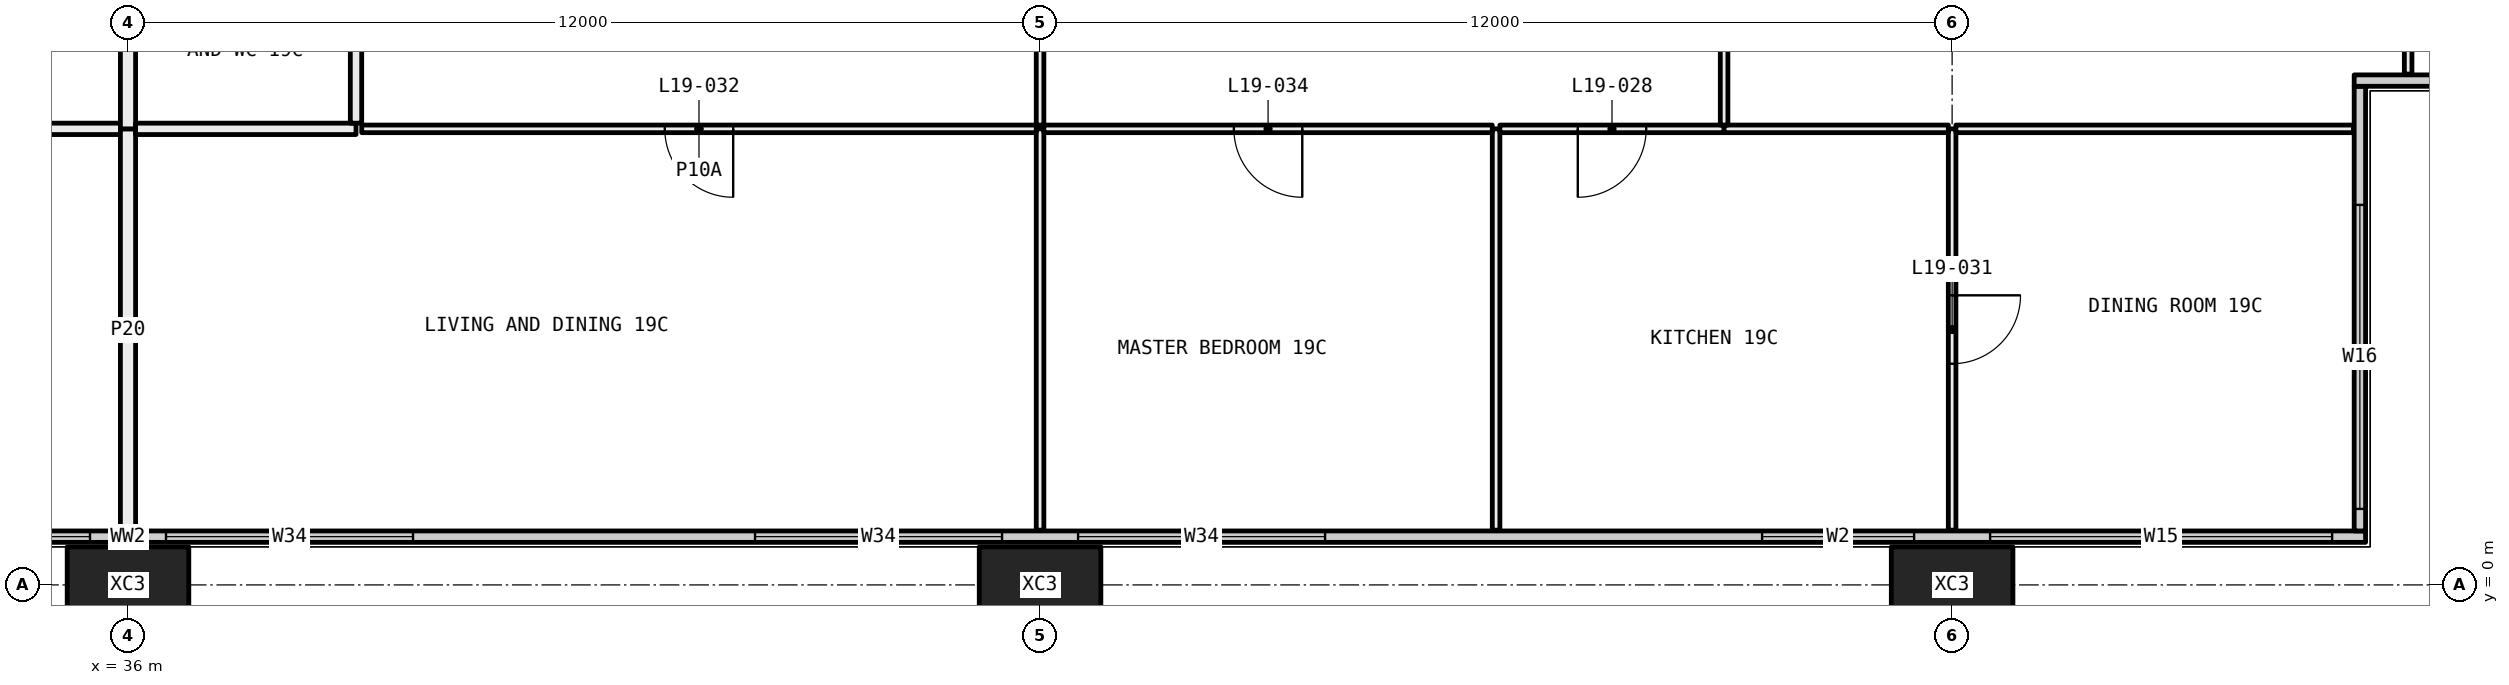
"""IFC4 building model, lengths in metres.
Left out: names, types, materials, properties, quantities, classifications, styles, units other than length and angle.
Written with IfcOpenShell. Run it as: python <this file> out.ifc"""

import sys

from ifc_helpers import new_model, si_unit, direction, frame, frame_2d, origin, origin_2d, place, context, subcontext, project, spatial, rectangle, hollow_rectangle, extrude, element, fill, save


model = new_model("IFC4")
c1 = context("Model", 3, precision=1e-05, world=origin(), true_north=direction((0.0, 1.0)))
c2 = subcontext(c1, "Body", "Model", "MODEL_VIEW")
j1 = project(units=[si_unit("LENGTHUNIT", "METRE"), si_unit("PLANEANGLEUNIT", "RADIAN")], contexts=[c1])
p1 = place(None, origin())
s1 = spatial("IfcSite", under=j1, at=p1, CompositionType="ELEMENT")
p2 = place(p1, origin())
s2 = spatial("IfcBuilding", under=s1, at=p2, CompositionType="ELEMENT")
p3 = place(p2, frame((0.0, 0.0, 78.3)))
s3 = spatial("IfcBuildingStorey", under=s2, at=p3, CompositionType="ELEMENT", Elevation=78.3)
for number, where, z_axis, x_axis in (
    (1, (36.0, 0.0, -0.4), (0.0, 0.0, 1.0), (1.0, 0.0, 0.0)),
    (2, (48.0, 0.0, -0.4), (0.0, 0.0, 1.0), (1.0, 0.0, 0.0)),
    (3, (60.0, 0.0, -0.4), (0.0, 0.0, 1.0), (1.0, 0.0, 0.0)),
):
    element("IfcColumn", number, at=place(p3, frame(where, z_axis=z_axis, x_axis=x_axis)), inside=s3, PredefinedType="COLUMN", context=c2, shape_type="SweptSolid", body=[
        extrude(hollow_rectangle(XDim=1.6, YDim=1.0, WallThickness=0.065, at=origin_2d()), origin(), (0.0, 0.0, 1.0), 3.45),
    ])
p4 = place(p3, frame((6.56, 0.635, 0.0), z_axis=(0.0, 0.0, 1.0), x_axis=(1.0, 0.0, 0.0)))
e4 = element("IfcWall", 4, at=p4, inside=s3, PredefinedType="ELEMENTEDWALL", context=c2, shape_type="SweptSolid", body=[
    extrude(rectangle(XDim=58.88, YDim=0.15, at=frame_2d((29.44, 0.0))), origin(), (0.0, 0.0, 1.0), 3.05),
])
p5 = place(p4, frame((0.44, 0.0, 0.45)))
e5 = element("IfcOpeningElement", 5, at=p5, cuts=e4, PredefinedType="OPENING", context=c2, shape_type="SweptSolid", body=[
    extrude(rectangle(XDim=4.5, YDim=2.55, at=frame_2d((2.25, 1.275))), frame((0.0, 0.085, 0.0), z_axis=(0.0, -1.0, 0.0), x_axis=(1.0, 0.0, 0.0)), (0.0, 0.0, 1.0), 0.17),
])
p6 = place(p4, frame((5.94, 0.0, 0.45)))
e6 = element("IfcOpeningElement", 6, at=p6, cuts=e4, PredefinedType="OPENING", context=c2, shape_type="SweptSolid", body=[
    extrude(rectangle(XDim=3.25, YDim=2.55, at=frame_2d((1.625, 1.275))), frame((0.0, 0.085, 0.0), z_axis=(0.0, -1.0, 0.0), x_axis=(1.0, 0.0, 0.0)), (0.0, 0.0, 1.0), 0.17),
])
p7 = place(p4, frame((13.69, 0.0, 0.45)))
e7 = element("IfcOpeningElement", 7, at=p7, cuts=e4, PredefinedType="OPENING", context=c2, shape_type="SweptSolid", body=[
    extrude(rectangle(XDim=3.25, YDim=2.55, at=frame_2d((1.625, 1.275))), frame((0.0, 0.085, 0.0), z_axis=(0.0, -1.0, 0.0), x_axis=(1.0, 0.0, 0.0)), (0.0, 0.0, 1.0), 0.17),
])
p8 = place(p4, frame((17.94, 0.0, 0.45)))
e8 = element("IfcOpeningElement", 8, at=p8, cuts=e4, PredefinedType="OPENING", context=c2, shape_type="SweptSolid", body=[
    extrude(rectangle(XDim=3.25, YDim=2.55, at=frame_2d((1.625, 1.275))), frame((0.0, 0.085, 0.0), z_axis=(0.0, -1.0, 0.0), x_axis=(1.0, 0.0, 0.0)), (0.0, 0.0, 1.0), 0.17),
])
p9 = place(p4, frame((26.94, 0.0, 0.45)))
e9 = element("IfcOpeningElement", 9, at=p9, cuts=e4, PredefinedType="OPENING", context=c2, shape_type="SweptSolid", body=[
    extrude(rectangle(XDim=2.0, YDim=2.55, at=frame_2d((1.0, 1.275))), frame((0.0, 0.085, 0.0), z_axis=(0.0, -1.0, 0.0), x_axis=(1.0, 0.0, 0.0)), (0.0, 0.0, 1.0), 0.17),
])
p10 = place(p4, frame((29.94, 0.0, 0.45)))
e10 = element("IfcOpeningElement", 10, at=p10, cuts=e4, PredefinedType="OPENING", context=c2, shape_type="SweptSolid", body=[
    extrude(rectangle(XDim=3.25, YDim=2.55, at=frame_2d((1.625, 1.275))), frame((0.0, 0.085, 0.0), z_axis=(0.0, -1.0, 0.0), x_axis=(1.0, 0.0, 0.0)), (0.0, 0.0, 1.0), 0.17),
])
p11 = place(p4, frame((37.69, 0.0, 0.45)))
e11 = element("IfcOpeningElement", 11, at=p11, cuts=e4, PredefinedType="OPENING", context=c2, shape_type="SweptSolid", body=[
    extrude(rectangle(XDim=3.25, YDim=2.55, at=frame_2d((1.625, 1.275))), frame((0.0, 0.085, 0.0), z_axis=(0.0, -1.0, 0.0), x_axis=(1.0, 0.0, 0.0)), (0.0, 0.0, 1.0), 0.17),
])
p12 = place(p4, frame((41.94, 0.0, 0.45)))
e12 = element("IfcOpeningElement", 12, at=p12, cuts=e4, PredefinedType="OPENING", context=c2, shape_type="SweptSolid", body=[
    extrude(rectangle(XDim=3.25, YDim=2.55, at=frame_2d((1.625, 1.275))), frame((0.0, 0.085, 0.0), z_axis=(0.0, -1.0, 0.0), x_axis=(1.0, 0.0, 0.0)), (0.0, 0.0, 1.0), 0.17),
])
p13 = place(p4, frame((50.94, 0.0, 0.45)))
e13 = element("IfcOpeningElement", 13, at=p13, cuts=e4, PredefinedType="OPENING", context=c2, shape_type="SweptSolid", body=[
    extrude(rectangle(XDim=2.0, YDim=2.55, at=frame_2d((1.0, 1.275))), frame((0.0, 0.085, 0.0), z_axis=(0.0, -1.0, 0.0), x_axis=(1.0, 0.0, 0.0)), (0.0, 0.0, 1.0), 0.17),
])
p14 = place(p4, frame((53.94, 0.0, 0.45)))
e14 = element("IfcOpeningElement", 14, at=p14, cuts=e4, PredefinedType="OPENING", context=c2, shape_type="SweptSolid", body=[
    extrude(rectangle(XDim=4.5, YDim=2.55, at=frame_2d((2.25, 1.275))), frame((0.0, 0.085, 0.0), z_axis=(0.0, -1.0, 0.0), x_axis=(1.0, 0.0, 0.0)), (0.0, 0.0, 1.0), 0.17),
])
p15 = place(p3, frame((65.365, 0.71, 0.0), z_axis=(0.0, 0.0, 1.0), x_axis=(0.0, 1.0, 0.0)))
e15 = element("IfcWall", 15, at=p15, inside=s3, PredefinedType="ELEMENTEDWALL", context=c2, shape_type="SweptSolid", body=[
    extrude(rectangle(XDim=5.85, YDim=0.15, at=frame_2d((2.925, 0.0))), origin(), (0.0, 0.0, 1.0), 3.05),
])
p16 = place(p15, frame((0.29, 0.0, 0.45)))
e16 = element("IfcOpeningElement", 16, at=p16, cuts=e15, PredefinedType="OPENING", context=c2, shape_type="SweptSolid", body=[
    extrude(rectangle(XDim=4.0, YDim=2.55, at=frame_2d((2.0, 1.275))), frame((0.0, 0.085, 0.0), z_axis=(0.0, -1.0, 0.0), x_axis=(1.0, 0.0, 0.0)), (0.0, 0.0, 1.0), 0.17),
])
p17 = place(p3, frame((65.29, 6.635, 0.0), z_axis=(0.0, 0.0, 1.0), x_axis=(1.0, 0.0, 0.0)))
e17 = element("IfcWall", 17, at=p17, inside=s3, PredefinedType="ELEMENTEDWALL", context=c2, shape_type="SweptSolid", body=[
    extrude(rectangle(XDim=6.15, YDim=0.15, at=frame_2d((3.075, 0.0))), origin(), (0.0, 0.0, 1.0), 3.05),
])
p18 = place(p17, frame((1.71, 0.0, 0.45)))
e18 = element("IfcOpeningElement", 18, at=p18, cuts=e17, PredefinedType="OPENING", context=c2, shape_type="SweptSolid", body=[
    extrude(rectangle(XDim=4.0, YDim=2.55, at=frame_2d((2.0, 1.275))), frame((0.0, 0.085, 0.0), z_axis=(0.0, -1.0, 0.0), x_axis=(1.0, 0.0, 0.0)), (0.0, 0.0, 1.0), 0.17),
])
p19 = place(p3, frame((35.9, 6.0, 0.0), z_axis=(0.0, 0.0, 1.0), x_axis=(-1.0, 0.0, 0.0)))
e19 = element("IfcWall", 19, at=p19, inside=s3, PredefinedType="PARTITIONING", context=c2, shape_type="SweptSolid", body=[
    extrude(rectangle(XDim=2.9, YDim=0.15, at=frame_2d((1.45, 0.0))), origin(), (0.0, 0.0, 1.0), 3.05),
])
p20 = place(p3, frame((36.0, 0.72, 0.0), z_axis=(0.0, 0.0, 1.0), x_axis=(0.0, 1.0, 0.0)))
e20 = element("IfcWall", 20, at=p20, inside=s3, PredefinedType="PARTITIONING", context=c2, shape_type="SweptSolid", body=[
    extrude(rectangle(XDim=5.28, YDim=0.2, at=frame_2d((2.64, 0.0))), origin(), (0.0, 0.0, 1.0), 2.45),
])
p21 = place(p3, frame((36.0, 6.0, 0.0), z_axis=(0.0, 0.0, 1.0), x_axis=(0.0, 1.0, 0.0)))
e21 = element("IfcWall", 21, at=p21, inside=s3, PredefinedType="PARTITIONING", context=c2, shape_type="SweptSolid", body=[
    extrude(rectangle(XDim=5.2, YDim=0.2, at=frame_2d((2.6, 0.0))), origin(), (0.0, 0.0, 1.0), 2.45),
])
p22 = place(p3, frame((48.0, 0.72, 0.0), z_axis=(0.0, 0.0, 1.0), x_axis=(0.0, 1.0, 0.0)))
e22 = element("IfcWall", 22, at=p22, inside=s3, PredefinedType="PARTITIONING", context=c2, shape_type="SweptSolid", body=[
    extrude(rectangle(XDim=5.28, YDim=0.1, at=frame_2d((2.64, 0.0))), origin(), (0.0, 0.0, 1.0), 2.45),
])
p23 = place(p3, frame((39.0, 6.0, 0.0), z_axis=(0.0, 0.0, 1.0), x_axis=(-1.0, 0.0, 0.0)))
e23 = element("IfcWall", 23, at=p23, inside=s3, PredefinedType="PARTITIONING", context=c2, shape_type="SweptSolid", body=[
    extrude(rectangle(XDim=2.9, YDim=0.15, at=frame_2d((1.45, 0.0))), origin(), (0.0, 0.0, 1.0), 3.05),
])
p24 = place(p3, frame((47.95, 6.0, 0.0), z_axis=(0.0, 0.0, 1.0), x_axis=(-1.0, 0.0, 0.0)))
e24 = element("IfcWall", 24, at=p24, inside=s3, PredefinedType="PARTITIONING", context=c2, shape_type="SweptSolid", body=[
    extrude(rectangle(XDim=8.875, YDim=0.1, at=frame_2d((4.438, 0.0))), origin(), (0.0, 0.0, 1.0), 2.45),
])
p25 = place(p24, frame((3.988, 0.0, 0.0)))
e25 = element("IfcOpeningElement", 25, at=p25, cuts=e24, PredefinedType="OPENING", context=c2, shape_type="SweptSolid", body=[
    extrude(rectangle(XDim=0.9, YDim=2.1, at=frame_2d((0.45, 1.05))), frame((0.0, 0.06, 0.0), z_axis=(0.0, -1.0, 0.0), x_axis=(1.0, 0.0, 0.0)), (0.0, 0.0, 1.0), 0.12),
])
p26 = place(p3, frame((54.0, 0.72, 0.0), z_axis=(0.0, 0.0, 1.0), x_axis=(0.0, 1.0, 0.0)))
e26 = element("IfcWall", 26, at=p26, inside=s3, PredefinedType="PARTITIONING", context=c2, shape_type="SweptSolid", body=[
    extrude(rectangle(XDim=5.28, YDim=0.1, at=frame_2d((2.64, 0.0))), origin(), (0.0, 0.0, 1.0), 3.05),
])
p27 = place(p3, frame((53.95, 6.0, 0.0), z_axis=(0.0, 0.0, 1.0), x_axis=(-1.0, 0.0, 0.0)))
e27 = element("IfcWall", 27, at=p27, inside=s3, PredefinedType="PARTITIONING", context=c2, shape_type="SweptSolid", body=[
    extrude(rectangle(XDim=5.9, YDim=0.1, at=frame_2d((2.95, 0.0))), origin(), (0.0, 0.0, 1.0), 2.45),
])
p28 = place(p27, frame((2.5, 0.0, 0.0)))
e28 = element("IfcOpeningElement", 28, at=p28, cuts=e27, PredefinedType="OPENING", context=c2, shape_type="SweptSolid", body=[
    extrude(rectangle(XDim=0.9, YDim=2.1, at=frame_2d((0.45, 1.05))), frame((0.0, 0.06, 0.0), z_axis=(0.0, -1.0, 0.0), x_axis=(1.0, 0.0, 0.0)), (0.0, 0.0, 1.0), 0.12),
])
p29 = place(p3, frame((60.0, 0.72, 0.0), z_axis=(0.0, 0.0, 1.0), x_axis=(0.0, 1.0, 0.0)))
e29 = element("IfcWall", 29, at=p29, inside=s3, PredefinedType="PARTITIONING", context=c2, shape_type="SweptSolid", body=[
    extrude(rectangle(XDim=5.28, YDim=0.1, at=frame_2d((2.64, 0.0))), origin(), (0.0, 0.0, 1.0), 2.45),
])
p30 = place(p29, frame((2.19, 0.0, 0.0)))
e30 = element("IfcOpeningElement", 30, at=p30, cuts=e29, PredefinedType="OPENING", context=c2, shape_type="SweptSolid", body=[
    extrude(rectangle(XDim=0.9, YDim=2.1, at=frame_2d((0.45, 1.05))), frame((0.0, 0.06, 0.0), z_axis=(0.0, -1.0, 0.0), x_axis=(1.0, 0.0, 0.0)), (0.0, 0.0, 1.0), 0.12),
])
p31 = place(p3, frame((57.0, 6.0, 0.0), z_axis=(0.0, 0.0, 1.0), x_axis=(-1.0, 0.0, 0.0)))
e31 = element("IfcWall", 31, at=p31, inside=s3, PredefinedType="PARTITIONING", context=c2, shape_type="SweptSolid", body=[
    extrude(rectangle(XDim=2.95, YDim=0.1, at=frame_2d((1.475, 0.0))), origin(), (0.0, 0.0, 1.0), 3.05),
])
p32 = place(p31, frame((1.025, 0.0, 0.0)))
e32 = element("IfcOpeningElement", 32, at=p32, cuts=e31, PredefinedType="OPENING", context=c2, shape_type="SweptSolid", body=[
    extrude(rectangle(XDim=0.9, YDim=2.1, at=frame_2d((0.45, 1.05))), frame((0.0, 0.06, 0.0), z_axis=(0.0, -1.0, 0.0), x_axis=(1.0, 0.0, 0.0)), (0.0, 0.0, 1.0), 0.12),
])
p33 = place(p3, frame((59.95, 6.0, 0.0), z_axis=(0.0, 0.0, 1.0), x_axis=(-1.0, 0.0, 0.0)))
e33 = element("IfcWall", 33, at=p33, inside=s3, PredefinedType="PARTITIONING", context=c2, shape_type="SweptSolid", body=[
    extrude(rectangle(XDim=2.95, YDim=0.1, at=frame_2d((1.475, 0.0))), origin(), (0.0, 0.0, 1.0), 2.45),
])
p34 = place(p3, frame((65.28, 6.0, 0.0), z_axis=(0.0, 0.0, 1.0), x_axis=(-1.0, 0.0, 0.0)))
e34 = element("IfcWall", 34, at=p34, inside=s3, PredefinedType="PARTITIONING", context=c2, shape_type="SweptSolid", body=[
    extrude(rectangle(XDim=5.23, YDim=0.1, at=frame_2d((2.615, 0.0))), origin(), (0.0, 0.0, 1.0), 2.45),
])
p35 = place(p3, frame((39.0, 6.075, 0.0), z_axis=(0.0, 0.0, 1.0), x_axis=(0.0, 1.0, 0.0)))
e35 = element("IfcWall", 35, at=p35, inside=s3, PredefinedType="PARTITIONING", context=c2, shape_type="SweptSolid", body=[
    extrude(rectangle(XDim=5.925, YDim=0.15, at=frame_2d((2.962, 0.0))), origin(), (0.0, 0.0, 1.0), 2.45),
])
p36 = place(p35, frame((2.512, 0.0, 0.0)))
e36 = element("IfcOpeningElement", 36, at=p36, cuts=e35, PredefinedType="OPENING", context=c2, shape_type="SweptSolid", body=[
    extrude(rectangle(XDim=0.9, YDim=2.1, at=frame_2d((0.45, 1.05))), frame((0.0, 0.085, 0.0), z_axis=(0.0, -1.0, 0.0), x_axis=(1.0, 0.0, 0.0)), (0.0, 0.0, 1.0), 0.17),
])
p37 = place(p3, frame((48.0, 6.05, 0.0), z_axis=(0.0, 0.0, 1.0), x_axis=(0.0, 1.0, 0.0)))
e37 = element("IfcWall", 37, at=p37, inside=s3, PredefinedType="PARTITIONING", context=c2, shape_type="SweptSolid", body=[
    extrude(rectangle(XDim=5.15, YDim=0.1, at=frame_2d((2.575, 0.0))), origin(), (0.0, 0.0, 1.0), 2.45),
])
p38 = place(p37, frame((2.125, 0.0, 0.0)))
e38 = element("IfcOpeningElement", 38, at=p38, cuts=e37, PredefinedType="OPENING", context=c2, shape_type="SweptSolid", body=[
    extrude(rectangle(XDim=0.9, YDim=2.1, at=frame_2d((0.45, 1.05))), frame((0.0, 0.06, 0.0), z_axis=(0.0, -1.0, 0.0), x_axis=(1.0, 0.0, 0.0)), (0.0, 0.0, 1.0), 0.12),
])
p39 = place(p3, frame((57.0, 6.05, 0.0), z_axis=(0.0, 0.0, 1.0), x_axis=(0.0, 1.0, 0.0)))
e39 = element("IfcWall", 39, at=p39, inside=s3, PredefinedType="PARTITIONING", context=c2, shape_type="SweptSolid", body=[
    extrude(rectangle(XDim=5.95, YDim=0.1, at=frame_2d((2.975, 0.0))), origin(), (0.0, 0.0, 1.0), 2.45),
])
p40 = place(p39, frame((2.525, 0.0, 0.0)))
e40 = element("IfcOpeningElement", 40, at=p40, cuts=e39, PredefinedType="OPENING", context=c2, shape_type="SweptSolid", body=[
    extrude(rectangle(XDim=0.9, YDim=2.1, at=frame_2d((0.45, 1.05))), frame((0.0, 0.06, 0.0), z_axis=(0.0, -1.0, 0.0), x_axis=(1.0, 0.0, 0.0)), (0.0, 0.0, 1.0), 0.12),
])
p41 = place(p3, frame((66.0, 6.72, 0.0), z_axis=(0.0, 0.0, 1.0), x_axis=(0.0, 1.0, 0.0)))
e41 = element("IfcWall", 41, at=p41, inside=s3, PredefinedType="PARTITIONING", context=c2, shape_type="SweptSolid", body=[
    extrude(rectangle(XDim=5.205, YDim=0.1, at=frame_2d((2.603, 0.0))), origin(), (0.0, 0.0, 1.0), 2.45),
])
p42 = place(p41, frame((2.153, 0.0, 0.0)))
e42 = element("IfcOpeningElement", 42, at=p42, cuts=e41, PredefinedType="OPENING", context=c2, shape_type="SweptSolid", body=[
    extrude(rectangle(XDim=0.9, YDim=2.1, at=frame_2d((0.45, 1.05))), frame((0.0, 0.06, 0.0), z_axis=(0.0, -1.0, 0.0), x_axis=(1.0, 0.0, 0.0)), (0.0, 0.0, 1.0), 0.12),
])
p43 = place(p9, origin())
e43 = element("IfcWindow", 43, at=p43, inside=s3, PartitioningType="SINGLE_PANEL", PredefinedType="WINDOW", context=c2, shape_type="SweptSolid", body=[
    extrude(rectangle(XDim=2.0, YDim=2.55, at=frame_2d((1.0, 1.275))), frame((0.0, 0.03, 0.0), z_axis=(0.0, -1.0, 0.0), x_axis=(1.0, 0.0, 0.0)), (0.0, 0.0, 1.0), 0.06),
])
fill(e9, e43)
p44 = place(p10, origin())
e44 = element("IfcWindow", 44, at=p44, inside=s3, PartitioningType="SINGLE_PANEL", PredefinedType="WINDOW", context=c2, shape_type="SweptSolid", body=[
    extrude(rectangle(XDim=3.25, YDim=2.55, at=frame_2d((1.625, 1.275))), frame((0.0, 0.03, 0.0), z_axis=(0.0, -1.0, 0.0), x_axis=(1.0, 0.0, 0.0)), (0.0, 0.0, 1.0), 0.06),
])
fill(e10, e44)
p45 = place(p11, origin())
e45 = element("IfcWindow", 45, at=p45, inside=s3, PartitioningType="SINGLE_PANEL", PredefinedType="WINDOW", context=c2, shape_type="SweptSolid", body=[
    extrude(rectangle(XDim=3.25, YDim=2.55, at=frame_2d((1.625, 1.275))), frame((0.0, 0.03, 0.0), z_axis=(0.0, -1.0, 0.0), x_axis=(1.0, 0.0, 0.0)), (0.0, 0.0, 1.0), 0.06),
])
fill(e11, e45)
p46 = place(p12, origin())
e46 = element("IfcWindow", 46, at=p46, inside=s3, PartitioningType="SINGLE_PANEL", PredefinedType="WINDOW", context=c2, shape_type="SweptSolid", body=[
    extrude(rectangle(XDim=3.25, YDim=2.55, at=frame_2d((1.625, 1.275))), frame((0.0, 0.03, 0.0), z_axis=(0.0, -1.0, 0.0), x_axis=(1.0, 0.0, 0.0)), (0.0, 0.0, 1.0), 0.06),
])
fill(e12, e46)
p47 = place(p13, origin())
e47 = element("IfcWindow", 47, at=p47, inside=s3, PartitioningType="SINGLE_PANEL", PredefinedType="WINDOW", context=c2, shape_type="SweptSolid", body=[
    extrude(rectangle(XDim=2.0, YDim=2.55, at=frame_2d((1.0, 1.275))), frame((0.0, 0.03, 0.0), z_axis=(0.0, -1.0, 0.0), x_axis=(1.0, 0.0, 0.0)), (0.0, 0.0, 1.0), 0.06),
])
fill(e13, e47)
p48 = place(p14, origin())
e48 = element("IfcWindow", 48, at=p48, inside=s3, PartitioningType="SINGLE_PANEL", PredefinedType="WINDOW", context=c2, shape_type="SweptSolid", body=[
    extrude(rectangle(XDim=4.5, YDim=2.55, at=frame_2d((2.25, 1.275))), frame((0.0, 0.03, 0.0), z_axis=(0.0, -1.0, 0.0), x_axis=(1.0, 0.0, 0.0)), (0.0, 0.0, 1.0), 0.06),
])
fill(e14, e48)
p49 = place(p16, origin())
e49 = element("IfcWindow", 49, at=p49, inside=s3, PartitioningType="SINGLE_PANEL", PredefinedType="WINDOW", context=c2, shape_type="SweptSolid", body=[
    extrude(rectangle(XDim=4.0, YDim=2.55, at=frame_2d((2.0, 1.275))), frame((0.0, 0.03, 0.0), z_axis=(0.0, -1.0, 0.0), x_axis=(1.0, 0.0, 0.0)), (0.0, 0.0, 1.0), 0.06),
])
fill(e16, e49)
p50 = place(p32, origin())
e50 = element("IfcDoor", 50, at=p50, inside=s3, OperationType="SINGLE_SWING_LEFT", PredefinedType="DOOR", context=c2, shape_type="SweptSolid", body=[
    extrude(rectangle(XDim=0.9, YDim=2.1, at=frame_2d((0.45, 1.05))), frame((0.0, 0.025, 0.0), z_axis=(0.0, -1.0, 0.0), x_axis=(1.0, 0.0, 0.0)), (0.0, 0.0, 1.0), 0.05),
])
fill(e32, e50)
p51 = place(p30, frame((0.9, 0.0, 0.0), x_axis=(-1.0, 0.0, 0.0)))
e51 = element("IfcDoor", 51, at=p51, inside=s3, OperationType="SINGLE_SWING_RIGHT", PredefinedType="DOOR", context=c2, shape_type="SweptSolid", body=[
    extrude(rectangle(XDim=0.9, YDim=2.1, at=frame_2d((0.45, 1.05))), frame((0.0, 0.025, 0.0), z_axis=(0.0, -1.0, 0.0), x_axis=(1.0, 0.0, 0.0)), (0.0, 0.0, 1.0), 0.05),
])
fill(e30, e51)
p52 = place(p25, origin())
e52 = element("IfcDoor", 52, at=p52, inside=s3, OperationType="SINGLE_SWING_RIGHT", PredefinedType="DOOR", context=c2, shape_type="SweptSolid", body=[
    extrude(rectangle(XDim=0.9, YDim=2.1, at=frame_2d((0.45, 1.05))), frame((0.0, 0.025, 0.0), z_axis=(0.0, -1.0, 0.0), x_axis=(1.0, 0.0, 0.0)), (0.0, 0.0, 1.0), 0.05),
])
fill(e25, e52)
p53 = place(p28, origin())
e53 = element("IfcDoor", 53, at=p53, inside=s3, OperationType="SINGLE_SWING_RIGHT", PredefinedType="DOOR", context=c2, shape_type="SweptSolid", body=[
    extrude(rectangle(XDim=0.9, YDim=2.1, at=frame_2d((0.45, 1.05))), frame((0.0, 0.025, 0.0), z_axis=(0.0, -1.0, 0.0), x_axis=(1.0, 0.0, 0.0)), (0.0, 0.0, 1.0), 0.05),
])
fill(e28, e53)
save(model, sys.argv[1])
